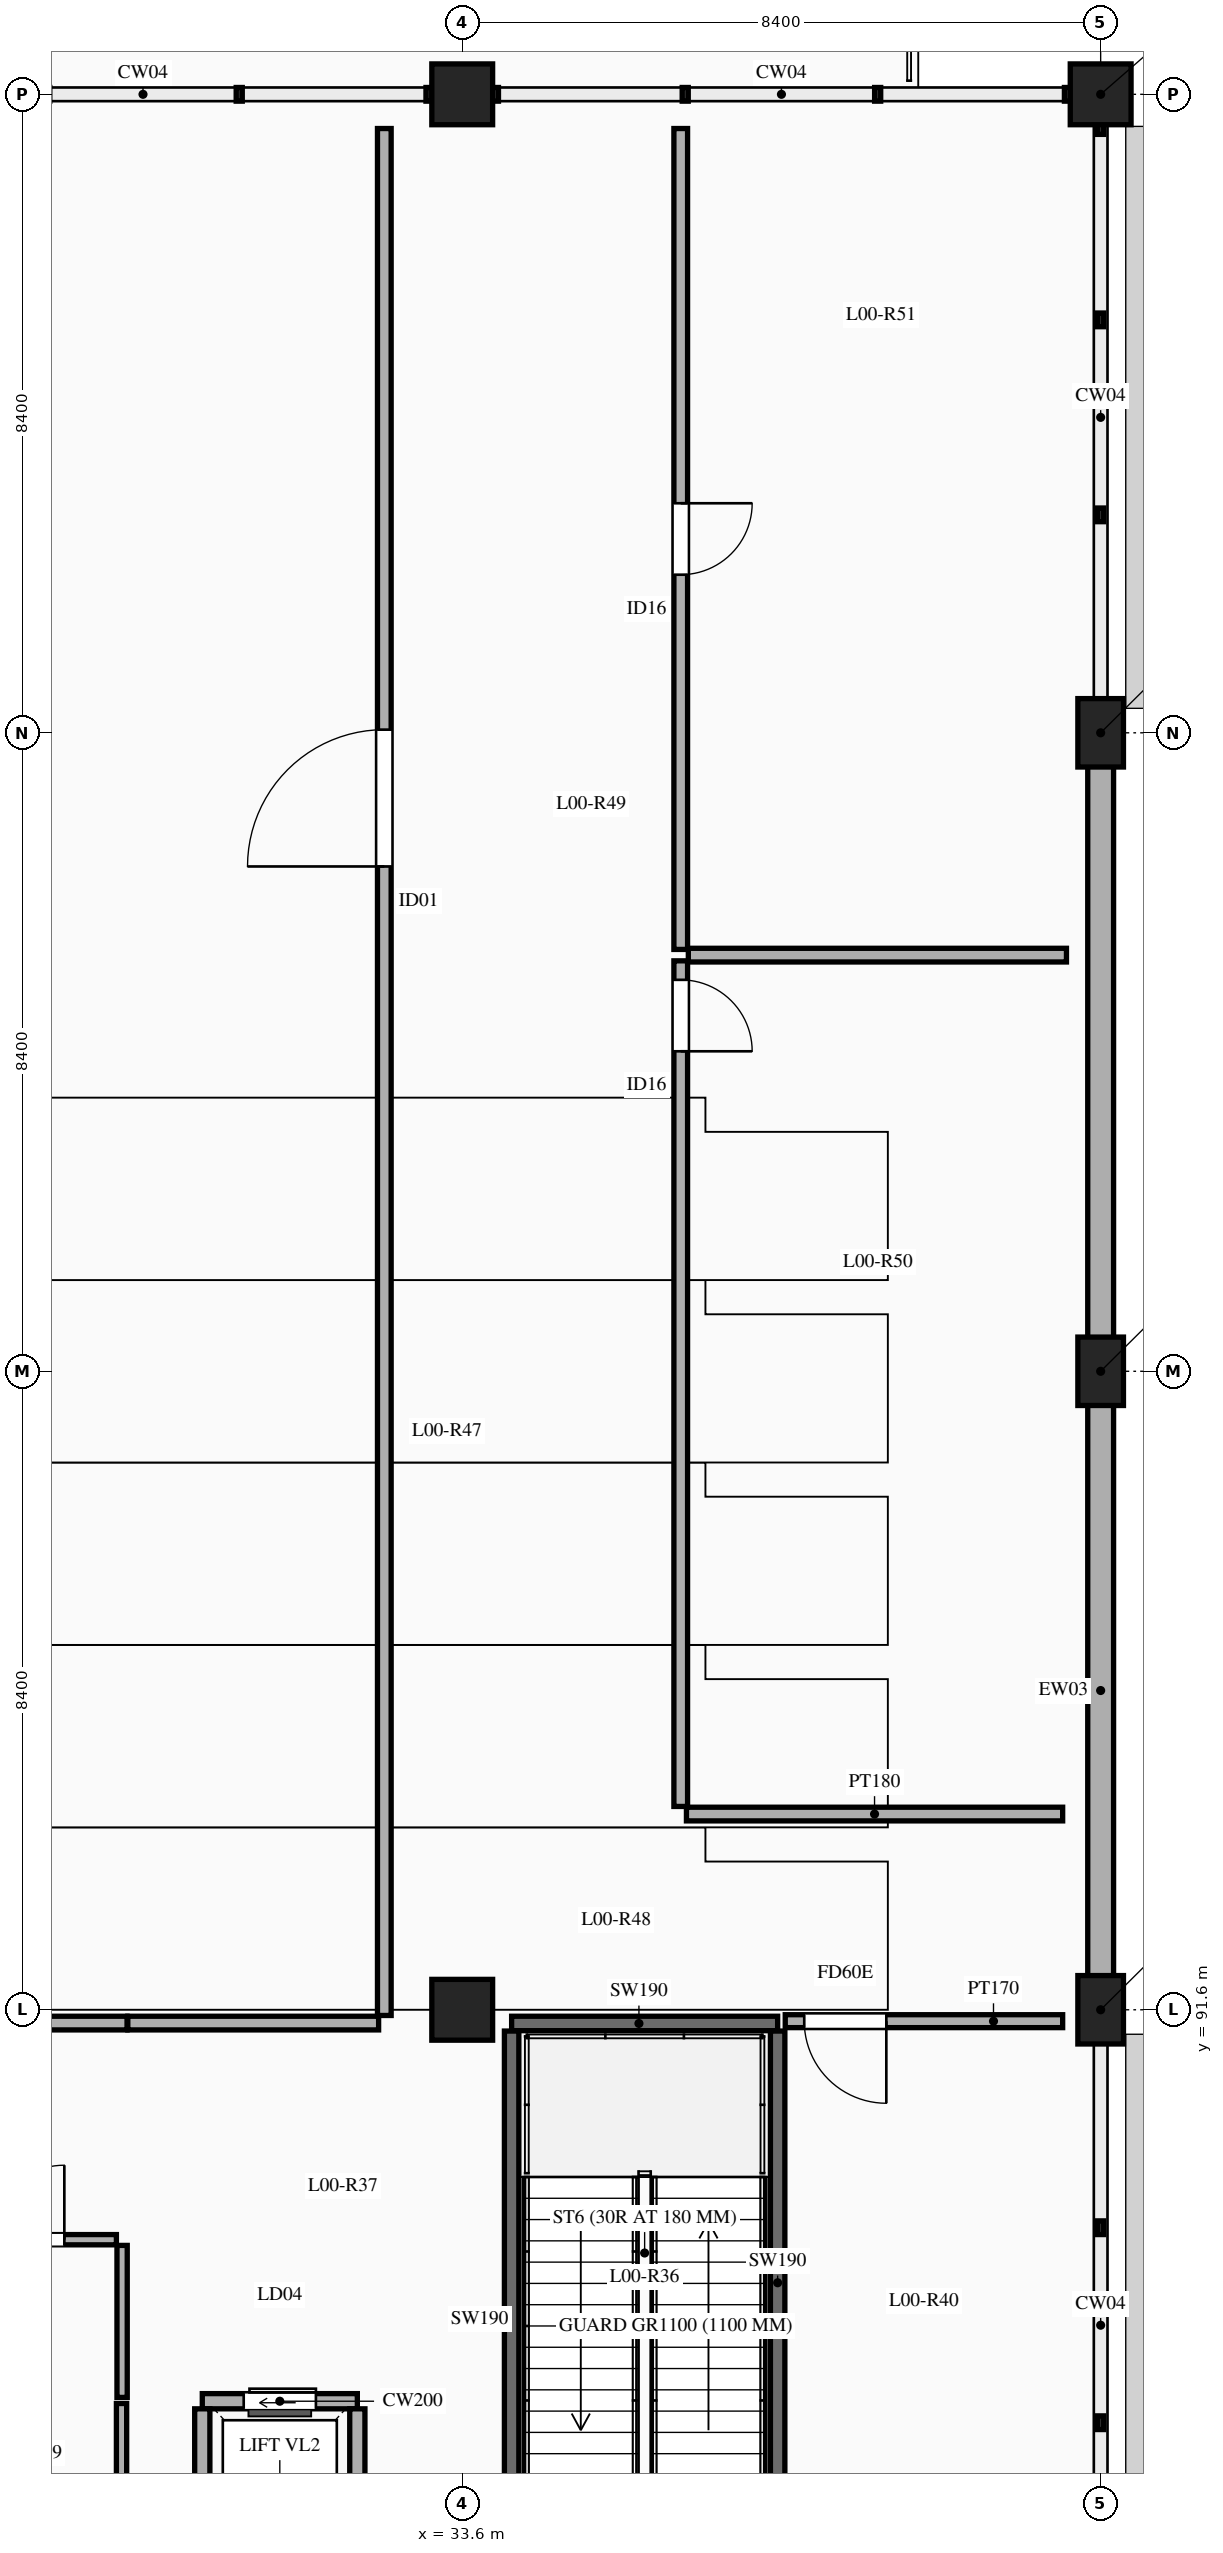
"""IFC4 building model, lengths in metres.
Left out: names, types, materials, properties, quantities, classifications, styles, units other than length and angle.
Written with IfcOpenShell. Run it as: python <this file> out.ifc"""

import sys

from ifc_helpers import new_model, si_unit, direction, frame, frame_2d, origin, origin_2d, place, context, subcontext, project, spatial, rectangle, extrude, element, fill, save


model = new_model("IFC4")
c1 = context("Model", 3, precision=1e-05, world=origin(), true_north=direction((0.0, 1.0)))
c2 = subcontext(c1, "Body", "Model", "MODEL_VIEW")
j1 = project(units=[si_unit("LENGTHUNIT", "METRE"), si_unit("PLANEANGLEUNIT", "RADIAN")], contexts=[c1])
p1 = place(None, origin())
s1 = spatial("IfcSite", under=j1, at=p1, CompositionType="ELEMENT")
p2 = place(p1, origin())
s2 = spatial("IfcBuilding", under=s1, at=p2, CompositionType="ELEMENT")
p3 = place(p2, origin())
s3 = spatial("IfcBuildingStorey", under=s2, at=p3, CompositionType="ELEMENT", Elevation=0.0)
for number, where, z_axis, x_axis in (
    (1, (33.6, 91.6, 0.0), (0.0, 0.0, 1.0), (1.0, 0.0, 0.0)),
    (2, (33.6, 116.8, 0.0), (0.0, 0.0, 1.0), (1.0, 0.0, 0.0)),
):
    element("IfcColumn", number, at=place(p3, frame(where, z_axis=z_axis, x_axis=x_axis)), inside=s3, PredefinedType="COLUMN", context=c2, shape_type="SweptSolid", body=[
        extrude(rectangle(XDim=0.8, YDim=0.8, at=origin_2d()), origin(), (0.0, 0.0, 1.0), 5.4),
    ])
for number, where, z_axis, x_axis in (
    (3, (42.0, 91.6, 0.0), (0.0, 0.0, 1.0), (0.0, 1.0, 0.0)),
    (4, (42.0, 100.0, 0.0), (0.0, 0.0, 1.0), (0.0, 1.0, 0.0)),
    (5, (42.0, 108.4, 0.0), (0.0, 0.0, 1.0), (0.0, 1.0, 0.0)),
):
    element("IfcColumn", number, at=place(p3, frame(where, z_axis=z_axis, x_axis=x_axis)), inside=s3, PredefinedType="COLUMN", context=c2, shape_type="SweptSolid", body=[
        extrude(rectangle(XDim=0.6, YDim=0.9, at=origin_2d()), origin(), (0.0, 0.0, 1.0), 5.4),
    ])
p4 = place(p3, frame((42.0, 116.8, 0.0), z_axis=(0.0, 0.0, 1.0), x_axis=(1.0, 0.0, 0.0)))
e6 = element("IfcColumn", 6, at=p4, inside=s3, PredefinedType="COLUMN", context=c2, shape_type="SweptSolid", body=[
    extrude(rectangle(XDim=0.8, YDim=0.8, at=origin_2d()), origin(), (0.0, 0.0, 1.0), 5.4),
])
for number, where, z_axis, x_axis in (
    (7, (42.0, 91.902, 0.0), (0.0, 0.0, 1.0), (0.0, 1.0, 0.0)),
    (8, (42.0, 100.302, 0.0), (0.0, 0.0, 1.0), (0.0, 1.0, 0.0)),
):
    element("IfcWall", number, at=place(p3, frame(where, z_axis=z_axis, x_axis=x_axis)), inside=s3, PredefinedType="SOLIDWALL", context=c2, shape_type="SweptSolid", body=[
        extrude(rectangle(XDim=7.796, YDim=0.34, at=frame_2d((3.898, 0.0))), origin(), (0.0, 0.0, 1.0), 4.65),
    ])
p5 = place(p3, frame((30.18, 86.45, 0.0), z_axis=(0.0, 0.0, 1.0), x_axis=(1.0, 0.0, 0.0)))
e9 = element("IfcWall", 9, at=p5, inside=s3, PredefinedType="SOLIDWALL", context=c2, shape_type="SweptSolid", body=[
    extrude(rectangle(XDim=2.04, YDim=0.2, at=frame_2d((1.02, 0.0))), origin(), (0.0, 0.0, 1.0), 5.2),
])
p6 = place(p5, frame((0.545, 0.0, 0.0)))
e10 = element("IfcOpeningElement", 10, at=p6, cuts=e9, PredefinedType="OPENING", context=c2, shape_type="SweptSolid", body=[
    extrude(rectangle(XDim=0.95, YDim=2.15, at=frame_2d((0.475, 1.075))), frame((0.0, 0.11, 0.0), z_axis=(0.0, -1.0, 0.0), x_axis=(1.0, 0.0, 0.0)), (0.0, 0.0, 1.0), 0.22),
])
for number, where, z_axis, x_axis in (
    (11, (30.18, 84.45, 0.0), (0.0, 0.0, 1.0), (0.0, 1.0, 0.0)),
    (12, (32.22, 84.45, 0.0), (0.0, 0.0, 1.0), (0.0, 1.0, 0.0)),
):
    element("IfcWall", number, at=place(p3, frame(where, z_axis=z_axis, x_axis=x_axis)), inside=s3, PredefinedType="SOLIDWALL", context=c2, shape_type="SweptSolid", body=[
        extrude(rectangle(XDim=1.9, YDim=0.2, at=frame_2d((0.95, 0.0))), origin(), (0.0, 0.0, 1.0), 5.2),
    ])
p7 = place(p3, frame((34.25, 91.42, 0.0), z_axis=(0.0, 0.0, 1.0), x_axis=(1.0, 0.0, 0.0)))
e13 = element("IfcWall", 13, at=p7, inside=s3, PredefinedType="SOLIDWALL", context=c2, shape_type="SweptSolid", body=[
    extrude(rectangle(XDim=3.5, YDim=0.19, at=frame_2d((1.75, 0.0))), origin(), (0.0, 0.0, 1.0), 5.2),
])
p8 = place(p3, frame((34.25, 83.74, 0.0), z_axis=(0.0, 0.0, 1.0), x_axis=(0.0, 1.0, 0.0)))
e14 = element("IfcWall", 14, at=p8, inside=s3, PredefinedType="SOLIDWALL", context=c2, shape_type="SweptSolid", body=[
    extrude(rectangle(XDim=7.58, YDim=0.19, at=frame_2d((3.79, 0.0))), origin(), (0.0, 0.0, 1.0), 5.2),
])
p9 = place(p3, frame((37.75, 83.74, 0.0), z_axis=(0.0, 0.0, 1.0), x_axis=(0.0, 1.0, 0.0)))
e15 = element("IfcWall", 15, at=p9, inside=s3, PredefinedType="SOLIDWALL", context=c2, shape_type="SweptSolid", body=[
    extrude(rectangle(XDim=7.58, YDim=0.19, at=frame_2d((3.79, 0.0))), origin(), (0.0, 0.0, 1.0), 5.2),
])
p10 = place(p9, frame((0.36, 0.0, 0.0)))
e16 = element("IfcOpeningElement", 16, at=p10, cuts=e15, PredefinedType="OPENING", context=c2, shape_type="SweptSolid", body=[
    extrude(rectangle(XDim=1.08, YDim=2.15, at=frame_2d((0.54, 1.075))), frame((0.0, 0.105, 0.0), z_axis=(0.0, -1.0, 0.0), x_axis=(1.0, 0.0, 0.0)), (0.0, 0.0, 1.0), 0.21),
])
p11 = place(p3, frame((29.125, 86.5, 0.0), z_axis=(0.0, 0.0, 1.0), x_axis=(0.0, 1.0, 0.0)))
e17 = element("IfcWall", 17, at=p11, inside=s3, PredefinedType="PARTITIONING", context=c2, shape_type="SweptSolid", body=[
    extrude(rectangle(XDim=2.0, YDim=0.135, at=frame_2d((1.0, 0.0))), origin(), (0.0, 0.0, 1.0), 4.35),
])
p12 = place(p3, frame((29.2, 91.425, 0.0), z_axis=(0.0, 0.0, 1.0), x_axis=(1.0, 0.0, 0.0)))
e18 = element("IfcWall", 18, at=p12, inside=s3, PredefinedType="PARTITIONING", context=c2, shape_type="SweptSolid", body=[
    extrude(rectangle(XDim=3.3, YDim=0.18, at=frame_2d((1.65, 0.0))), origin(), (0.0, 0.0, 1.0), 4.35),
])
p13 = place(p3, frame((26.7, 88.575, 0.0), z_axis=(0.0, 0.0, 1.0), x_axis=(1.0, 0.0, 0.0)))
e19 = element("IfcWall", 19, at=p13, inside=s3, PredefinedType="PARTITIONING", context=c2, shape_type="SweptSolid", body=[
    extrude(rectangle(XDim=2.35, YDim=0.135, at=frame_2d((1.175, 0.0))), origin(), (0.0, 0.0, 1.0), 4.35),
])
p14 = place(p13, frame((0.685, 0.0, 0.0)))
e20 = element("IfcOpeningElement", 20, at=p14, cuts=e19, PredefinedType="OPENING", context=c2, shape_type="SweptSolid", body=[
    extrude(rectangle(XDim=0.98, YDim=2.15, at=frame_2d((0.49, 1.075))), frame((0.0, 0.077, 0.0), z_axis=(0.0, -1.0, 0.0), x_axis=(1.0, 0.0, 0.0)), (0.0, 0.0, 1.0), 0.155),
])
p15 = place(p3, frame((17.23, 91.425, 0.0), z_axis=(0.0, 0.0, 1.0), x_axis=(1.0, 0.0, 0.0)))
e21 = element("IfcWall", 21, at=p15, inside=s3, PredefinedType="PARTITIONING", context=c2, shape_type="SweptSolid", body=[
    extrude(rectangle(XDim=11.96, YDim=0.18, at=frame_2d((5.98, 0.0))), origin(), (0.0, 0.0, 1.0), 4.35),
])
p16 = place(p3, frame((37.85, 91.45, 0.0), z_axis=(0.0, 0.0, 1.0), x_axis=(1.0, 0.0, 0.0)))
e22 = element("IfcWall", 22, at=p16, inside=s3, PredefinedType="PARTITIONING", context=c2, shape_type="SweptSolid", body=[
    extrude(rectangle(XDim=3.65, YDim=0.17, at=frame_2d((1.825, 0.0))), origin(), (0.0, 0.0, 1.0), 4.35),
])
p17 = place(p16, frame((0.25, 0.0, 0.0)))
e23 = element("IfcOpeningElement", 23, at=p17, cuts=e22, PredefinedType="OPENING", context=c2, shape_type="SweptSolid", body=[
    extrude(rectangle(XDim=1.08, YDim=2.15, at=frame_2d((0.54, 1.075))), frame((0.0, 0.095, 0.0), z_axis=(0.0, -1.0, 0.0), x_axis=(1.0, 0.0, 0.0)), (0.0, 0.0, 1.0), 0.19),
])
p18 = place(p3, frame((32.575, 91.525, 0.0), z_axis=(0.0, 0.0, 1.0), x_axis=(0.0, 1.0, 0.0)))
e24 = element("IfcWall", 24, at=p18, inside=s3, PredefinedType="PARTITIONING", context=c2, shape_type="SweptSolid", body=[
    extrude(rectangle(XDim=24.825, YDim=0.18, at=frame_2d((12.413, 0.0))), origin(), (0.0, 0.0, 1.0), 4.35),
])
p19 = place(p18, frame((15.116, 0.0, 0.0)))
e25 = element("IfcOpeningElement", 25, at=p19, cuts=e24, PredefinedType="OPENING", context=c2, shape_type="SweptSolid", body=[
    extrude(rectangle(XDim=1.8, YDim=2.4, at=frame_2d((0.9, 1.2))), frame((0.0, 0.1, 0.0), z_axis=(0.0, -1.0, 0.0), x_axis=(1.0, 0.0, 0.0)), (0.0, 0.0, 1.0), 0.2),
])
p20 = place(p3, frame((36.55, 94.175, 0.0), z_axis=(0.0, 0.0, 1.0), x_axis=(1.0, 0.0, 0.0)))
e26 = element("IfcWall", 26, at=p20, inside=s3, PredefinedType="PARTITIONING", context=c2, shape_type="SweptSolid", body=[
    extrude(rectangle(XDim=4.95, YDim=0.18, at=frame_2d((2.475, 0.0))), origin(), (0.0, 0.0, 1.0), 1.963),
])
p21 = place(p3, frame((36.475, 94.275, 0.0), z_axis=(0.0, 0.0, 1.0), x_axis=(0.0, 1.0, 0.0)))
e27 = element("IfcWall", 27, at=p21, inside=s3, PredefinedType="PARTITIONING", context=c2, shape_type="SweptSolid", body=[
    extrude(rectangle(XDim=11.125, YDim=0.18, at=frame_2d((5.562, 0.0))), origin(), (0.0, 0.0, 1.0), 4.35),
])
p22 = place(p21, frame((9.935, 0.0, 0.0)))
e28 = element("IfcOpeningElement", 28, at=p22, cuts=e27, PredefinedType="OPENING", context=c2, shape_type="SweptSolid", body=[
    extrude(rectangle(XDim=0.94, YDim=2.1, at=frame_2d((0.47, 1.05))), frame((0.0, 0.1, 0.0), z_axis=(0.0, -1.0, 0.0), x_axis=(1.0, 0.0, 0.0)), (0.0, 0.0, 1.0), 0.2),
])
p23 = place(p3, frame((36.475, 105.55, 0.0), z_axis=(0.0, 0.0, 1.0), x_axis=(0.0, 1.0, 0.0)))
e29 = element("IfcWall", 29, at=p23, inside=s3, PredefinedType="PARTITIONING", context=c2, shape_type="SweptSolid", body=[
    extrude(rectangle(XDim=10.8, YDim=0.18, at=frame_2d((5.4, 0.0))), origin(), (0.0, 0.0, 1.0), 4.35),
])
p24 = place(p23, frame((4.93, 0.0, 0.0)))
e30 = element("IfcOpeningElement", 30, at=p24, cuts=e29, PredefinedType="OPENING", context=c2, shape_type="SweptSolid", body=[
    extrude(rectangle(XDim=0.94, YDim=2.1, at=frame_2d((0.47, 1.05))), frame((0.0, 0.1, 0.0), z_axis=(0.0, -1.0, 0.0), x_axis=(1.0, 0.0, 0.0)), (0.0, 0.0, 1.0), 0.2),
])
p25 = place(p3, frame((36.575, 105.475, 0.0), z_axis=(0.0, 0.0, 1.0), x_axis=(1.0, 0.0, 0.0)))
e31 = element("IfcWall", 31, at=p25, inside=s3, PredefinedType="PARTITIONING", context=c2, shape_type="SweptSolid", body=[
    extrude(rectangle(XDim=4.975, YDim=0.18, at=frame_2d((2.488, 0.0))), origin(), (0.0, 0.0, 1.0), 4.35),
])
p26 = place(p3, frame((29.117, 83.61, 0.0), z_axis=(0.0, 0.0, 1.0), x_axis=(0.0, 1.0, 0.0)))
e32 = element("IfcWall", 32, at=p26, inside=s3, PredefinedType="PARTITIONING", context=c2, shape_type="SweptSolid", body=[
    extrude(rectangle(XDim=2.81, YDim=0.135, at=frame_2d((1.405, 0.0))), origin(), (0.0, 0.0, 1.0), 4.35),
])
p27 = place(p6, origin())
e33 = element("IfcDoor", 33, at=p27, inside=s3, OperationType="SLIDING_TO_LEFT", PredefinedType="DOOR", context=c2, shape_type="SweptSolid", body=[
    extrude(rectangle(XDim=0.95, YDim=2.15, at=frame_2d((0.475, 1.075))), frame((0.0, 0.025, 0.0), z_axis=(0.0, -1.0, 0.0), x_axis=(1.0, 0.0, 0.0)), (0.0, 0.0, 1.0), 0.05),
])
fill(e10, e33)
p28 = place(p14, origin())
e34 = element("IfcDoor", 34, at=p28, inside=s3, OperationType="SINGLE_SWING_RIGHT", PredefinedType="DOOR", context=c2, shape_type="SweptSolid", body=[
    extrude(rectangle(XDim=0.98, YDim=2.15, at=frame_2d((0.49, 1.075))), frame((0.0, 0.025, 0.0), z_axis=(0.0, -1.0, 0.0), x_axis=(1.0, 0.0, 0.0)), (0.0, 0.0, 1.0), 0.05),
])
fill(e20, e34)
p29 = place(p19, origin())
e35 = element("IfcDoor", 35, at=p29, inside=s3, OperationType="SINGLE_SWING_LEFT", PredefinedType="DOOR", context=c2, shape_type="SweptSolid", body=[
    extrude(rectangle(XDim=1.8, YDim=2.4, at=frame_2d((0.9, 1.2))), frame((0.0, 0.025, 0.0), z_axis=(0.0, -1.0, 0.0), x_axis=(1.0, 0.0, 0.0)), (0.0, 0.0, 1.0), 0.05),
])
fill(e25, e35)
p30 = place(p22, frame((0.94, 0.0, 0.0), z_axis=(0.0, 0.0, 1.0), x_axis=(-1.0, 0.0, 0.0)))
e36 = element("IfcDoor", 36, at=p30, inside=s3, OperationType="SINGLE_SWING_RIGHT", PredefinedType="DOOR", context=c2, shape_type="SweptSolid", body=[
    extrude(rectangle(XDim=0.94, YDim=2.1, at=frame_2d((0.47, 1.05))), frame((0.0, 0.025, 0.0), z_axis=(0.0, -1.0, 0.0), x_axis=(1.0, 0.0, 0.0)), (0.0, 0.0, 1.0), 0.05),
])
fill(e28, e36)
p31 = place(p24, frame((0.94, 0.0, 0.0), z_axis=(0.0, 0.0, 1.0), x_axis=(-1.0, 0.0, 0.0)))
e37 = element("IfcDoor", 37, at=p31, inside=s3, OperationType="SINGLE_SWING_LEFT", PredefinedType="DOOR", context=c2, shape_type="SweptSolid", body=[
    extrude(rectangle(XDim=0.94, YDim=2.1, at=frame_2d((0.47, 1.05))), frame((0.0, 0.025, 0.0), z_axis=(0.0, -1.0, 0.0), x_axis=(1.0, 0.0, 0.0)), (0.0, 0.0, 1.0), 0.05),
])
fill(e30, e37)
p32 = place(p17, frame((1.08, 0.0, 0.0), z_axis=(0.0, 0.0, 1.0), x_axis=(-1.0, 0.0, 0.0)))
e38 = element("IfcDoor", 38, at=p32, inside=s3, OperationType="SINGLE_SWING_LEFT", PredefinedType="DOOR", context=c2, shape_type="SweptSolid", body=[
    extrude(rectangle(XDim=1.08, YDim=2.15, at=frame_2d((0.54, 1.075))), frame((0.0, 0.025, 0.0), z_axis=(0.0, -1.0, 0.0), x_axis=(1.0, 0.0, 0.0)), (0.0, 0.0, 1.0), 0.05),
])
fill(e23, e38)
save(model, sys.argv[1])
